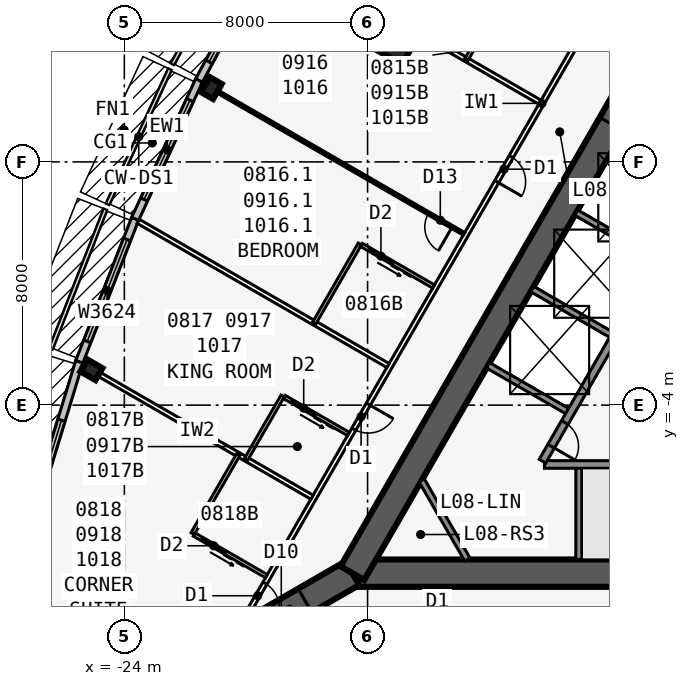
"""IFC4 building model, lengths in metres.
Left out: names, types, materials, properties, quantities, classifications, styles, units other than length and angle.
Written with IfcOpenShell. Run it as: python <this file> out.ifc"""

import sys

from ifc_helpers import new_model, si_unit, direction, frame, frame_2d, origin, origin_2d, place, context, subcontext, project, spatial, rectangle, i_section, extrude, element, fill, save


model = new_model("IFC4")
c1 = context("Model", 3, precision=1e-05, world=origin(), true_north=direction((0.0, 1.0)))
c2 = subcontext(c1, "Body", "Model", "MODEL_VIEW")
j1 = project(units=[si_unit("LENGTHUNIT", "METRE"), si_unit("PLANEANGLEUNIT", "RADIAN")], contexts=[c1])
p1 = place(None, origin())
s1 = spatial("IfcSite", under=j1, at=p1, CompositionType="ELEMENT")
p2 = place(p1, origin())
s2 = spatial("IfcBuilding", under=s1, at=p2, CompositionType="ELEMENT")
p3 = place(p2, frame((0.0, 0.0, 38.7)))
s3 = spatial("IfcBuildingStorey", under=s2, at=p3, CompositionType="ELEMENT", Elevation=38.7)
p4 = place(p3, frame((-16.5, -9.526, 0.0), z_axis=(0.0, 0.0, 1.0), x_axis=(1.0, 0.0, 0.0)))
e1 = element("IfcWall", 1, at=p4, inside=s3, PredefinedType="SHEAR", context=c2, shape_type="SweptSolid", body=[
    extrude(rectangle(XDim=33.0, YDim=0.9, at=frame_2d((16.5, 0.0))), origin(), (0.0, 0.0, 1.0), 3.4),
])
p5 = place(p4, frame((14.05, 0.0, 0.0)))
e2 = element("IfcOpeningElement", 2, at=p5, cuts=e1, PredefinedType="OPENING", context=c2, shape_type="SweptSolid", body=[
    extrude(rectangle(XDim=1.8, YDim=2.13, at=frame_2d((0.9, 1.065))), frame((0.0, 0.46, 0.0), z_axis=(0.0, -1.0, 0.0), x_axis=(1.0, 0.0, 0.0)), (0.0, 0.0, 1.0), 0.92),
])
p6 = place(p3, frame((-10.183, -5.951, 0.0), z_axis=(0.0, 0.0, 1.0), x_axis=(1.0, 0.0, 0.0)))
e3 = element("IfcWall", 3, at=p6, inside=s3, PredefinedType="SOLIDWALL", context=c2, shape_type="SweptSolid", body=[
    extrude(rectangle(XDim=7.633, YDim=0.25, at=frame_2d((3.816, 0.0))), origin(), (0.0, 0.0, 1.0), 3.235),
])
p7 = place(p3, frame((-9.05, -5.951, 0.0), z_axis=(0.0, 0.0, 1.0), x_axis=(0.0, -1.0, 0.0)))
e4 = element("IfcWall", 4, at=p7, inside=s3, PredefinedType="SOLIDWALL", context=c2, shape_type="SweptSolid", body=[
    extrude(rectangle(XDim=3.125, YDim=0.2, at=frame_2d((1.562, 0.0))), origin(), (0.0, 0.0, 1.0), 3.235),
])
p8 = place(p3, frame((0.0, 19.052, 0.0), z_axis=(0.0, 0.0, 1.0), x_axis=(-0.499999749417, -0.866025548458, 0.0)))
e5 = element("IfcWall", 5, at=p8, inside=s3, PredefinedType="SHEAR", context=c2, shape_type="SweptSolid", body=[
    extrude(rectangle(XDim=33.0, YDim=0.9, at=frame_2d((16.5, 0.0))), origin(), (0.0, 0.0, 1.0), 3.4),
])
p9 = place(p8, frame((14.15, 0.0, 0.0)))
e6 = element("IfcOpeningElement", 6, at=p9, cuts=e5, PredefinedType="OPENING", context=c2, shape_type="SweptSolid", body=[
    extrude(rectangle(XDim=1.8, YDim=2.13, at=frame_2d((0.9, 1.065))), frame((0.0, 0.46, 0.0), z_axis=(0.0, -1.0, 0.0), x_axis=(1.0, 0.0, 0.0)), (0.0, 0.0, 1.0), 0.92),
])
p10 = place(p8, frame((12.6, 0.0, 0.0)))
e7 = element("IfcOpeningElement", 7, at=p10, cuts=e5, PredefinedType="OPENING", context=c2, shape_type="SweptSolid", body=[
    extrude(rectangle(XDim=1.0, YDim=2.13, at=frame_2d((0.5, 1.065))), frame((0.0, 0.46, 0.0), z_axis=(0.0, -1.0, 0.0), x_axis=(1.0, 0.0, 0.0)), (0.0, 0.0, 1.0), 0.92),
])
p11 = place(p3, frame((-4.929, 3.365, 0.0), z_axis=(0.0, 0.0, 1.0), x_axis=(-0.499991433582, -0.866030349552, 0.0)))
e8 = element("IfcWall", 8, at=p11, inside=s3, PredefinedType="SOLIDWALL", context=c2, shape_type="SweptSolid", body=[
    extrude(rectangle(XDim=10.633, YDim=0.25, at=frame_2d((5.316, 0.0))), origin(), (0.0, 0.0, 1.0), 3.235),
])
p12 = place(p11, frame((9.164, 0.0, 0.0)))
e9 = element("IfcOpeningElement", 9, at=p12, cuts=e8, PredefinedType="OPENING", context=c2, shape_type="SweptSolid", body=[
    extrude(rectangle(XDim=0.9, YDim=2.13, at=frame_2d((0.45, 1.065))), frame((0.0, 0.135, 0.0), z_axis=(0.0, -1.0, 0.0), x_axis=(1.0, 0.0, 0.0)), (0.0, 0.0, 1.0), 0.27),
])
for number, where, z_axis, x_axis in (
    (10, (-6.429, 0.767, 0.0), (0.0, 0.0, 1.0), (-0.866, 0.5, 0.0)),
    (11, (-7.879, -1.744, 0.0), (0.0, 0.0, 1.0), (-0.866, 0.5, 0.0)),
    (12, (-9.329, -4.256, 0.0), (0.0, 0.0, 1.0), (-0.866, 0.5, 0.0)),
):
    element("IfcWall", number, at=place(p3, frame(where, z_axis=z_axis, x_axis=x_axis)), inside=s3, PredefinedType="SOLIDWALL", context=c2, shape_type="SweptSolid", body=[
        extrude(rectangle(XDim=3.125, YDim=0.2, at=frame_2d((1.562, 0.0))), origin(), (0.0, 0.0, 1.0), 3.235),
    ])
p13 = place(p3, frame((-16.5, -9.526, 0.0), z_axis=(0.0, 0.0, 1.0), x_axis=(-0.866031398331, -0.499989616998, 0.0)))
e13 = element("IfcWall", 13, at=p13, inside=s3, PredefinedType="SHEAR", context=c2, shape_type="SweptSolid", body=[
    extrude(rectangle(XDim=4.746, YDim=0.9, at=frame_2d((2.373, 0.0))), origin(), (0.0, 0.0, 1.0), 3.4),
])
p14 = place(p13, frame((1.8, 0.0, 0.0)))
e14 = element("IfcOpeningElement", 14, at=p14, cuts=e13, PredefinedType="OPENING", context=c2, shape_type="SweptSolid", body=[
    extrude(rectangle(XDim=1.8, YDim=2.13, at=frame_2d((0.9, 1.065))), frame((0.0, 0.46, 0.0), z_axis=(0.0, -1.0, 0.0), x_axis=(1.0, 0.0, 0.0)), (0.0, 0.0, 1.0), 0.92),
])
for number, where, z_axis, x_axis in (
    (15, (-21.137, 6.43, 0.0), (0.0, 0.0, 1.0), (-0.866, 0.5, 0.0)),
    (16, (-25.083, -2.839, 0.0), (0.0, 0.0, 1.0), (-0.5, -0.866, 0.0)),
):
    element("IfcColumn", number, at=place(p3, frame(where, z_axis=z_axis, x_axis=x_axis)), inside=s3, PredefinedType="COLUMN", context=c2, shape_type="SweptSolid", body=[
        extrude(i_section(OverallWidth=0.455, OverallDepth=0.569, WebThickness=0.078, FlangeThickness=0.125, at=origin_2d()), origin(), (0.0, 0.0, 1.0), 3.4),
    ])
p15 = place(p3, frame((-15.312, 8.84, 0.0), z_axis=(0.0, 0.0, 1.0), x_axis=(-0.866025403784, 0.5, 0.0)))
e17 = element("IfcColumn", 17, at=p15, inside=s3, PredefinedType="COLUMN", context=c2, shape_type="SweptSolid", body=[
    extrude(rectangle(XDim=2.4, YDim=2.4, at=origin_2d()), origin(), (0.0, 0.0, 1.0), 3.4),
])
p16 = place(p3, frame((-19.178, 11.077, 0.0), z_axis=(0.0, 0.0, 1.0), x_axis=(-0.473412820489, -0.880840678782, 0.0)))
e18 = element("IfcWall", 18, at=p16, inside=s3, PredefinedType="STANDARD", context=c2, shape_type="SweptSolid", body=[
    extrude(rectangle(XDim=5.002, YDim=0.25, at=frame_2d((2.501, 0.0))), origin(), (0.0, 0.0, 1.0), 3.235),
])
p17 = place(p16, frame((0.701, 0.0, 0.45)))
e19 = element("IfcOpeningElement", 19, at=p17, cuts=e18, PredefinedType="OPENING", context=c2, shape_type="SweptSolid", body=[
    extrude(rectangle(XDim=3.6, YDim=2.4, at=frame_2d((1.8, 1.2))), frame((0.0, 0.135, 0.0), z_axis=(0.0, -1.0, 0.0), x_axis=(1.0, 0.0, 0.0)), (0.0, 0.0, 1.0), 0.27),
])
p18 = place(p3, frame((-21.543, 6.678, 0.0), z_axis=(0.0, 0.0, 1.0), x_axis=(-0.419203100754, -0.907892482796, 0.0)))
e20 = element("IfcWall", 20, at=p18, inside=s3, PredefinedType="STANDARD", context=c2, shape_type="SweptSolid", body=[
    extrude(rectangle(XDim=5.021, YDim=0.25, at=frame_2d((2.51, 0.0))), origin(), (0.0, 0.0, 1.0), 3.235),
])
p19 = place(p18, frame((0.71, 0.0, 0.45)))
e21 = element("IfcOpeningElement", 21, at=p19, cuts=e20, PredefinedType="OPENING", context=c2, shape_type="SweptSolid", body=[
    extrude(rectangle(XDim=3.6, YDim=2.4, at=frame_2d((1.8, 1.2))), frame((0.0, 0.135, 0.0), z_axis=(0.0, -1.0, 0.0), x_axis=(1.0, 0.0, 0.0)), (0.0, 0.0, 1.0), 0.27),
])
p20 = place(p3, frame((-23.645, 2.126, 0.0), z_axis=(0.0, 0.0, 1.0), x_axis=(-0.364013463868, -0.931393685894, 0.0)))
e22 = element("IfcWall", 22, at=p20, inside=s3, PredefinedType="STANDARD", context=c2, shape_type="SweptSolid", body=[
    extrude(rectangle(XDim=5.058, YDim=0.25, at=frame_2d((2.529, 0.0))), origin(), (0.0, 0.0, 1.0), 3.235),
])
p21 = place(p20, frame((0.729, 0.0, 0.45)))
e23 = element("IfcOpeningElement", 23, at=p21, cuts=e22, PredefinedType="OPENING", context=c2, shape_type="SweptSolid", body=[
    extrude(rectangle(XDim=3.6, YDim=2.4, at=frame_2d((1.8, 1.2))), frame((0.0, 0.135, 0.0), z_axis=(0.0, -1.0, 0.0), x_axis=(1.0, 0.0, 0.0)), (0.0, 0.0, 1.0), 0.27),
])
p22 = place(p3, frame((-25.483, -2.575, 0.0), z_axis=(0.0, 0.0, 1.0), x_axis=(-0.2919790669, -0.956424709265, 0.0)))
e24 = element("IfcWall", 24, at=p22, inside=s3, PredefinedType="STANDARD", context=c2, shape_type="SweptSolid", body=[
    extrude(rectangle(XDim=8.211, YDim=0.25, at=frame_2d((4.105, 0.0))), origin(), (0.0, 0.0, 1.0), 3.235),
])
p23 = place(p22, frame((2.006, 0.0, 0.45)))
e25 = element("IfcOpeningElement", 25, at=p23, cuts=e24, PredefinedType="OPENING", context=c2, shape_type="SweptSolid", body=[
    extrude(rectangle(XDim=4.2, YDim=2.4, at=frame_2d((2.1, 1.2))), frame((0.0, 0.135, 0.0), z_axis=(0.0, -1.0, 0.0), x_axis=(1.0, 0.0, 0.0)), (0.0, 0.0, 1.0), 0.27),
])
p24 = place(p3, frame((-0.5, 22.836, 0.0), z_axis=(0.0, 0.0, 1.0), x_axis=(-0.500001677587, -0.866024435227, 0.0)))
e26 = element("IfcWall", 26, at=p24, inside=s3, PredefinedType="PARTITIONING", context=c2, shape_type="SweptSolid", body=[
    extrude(rectangle(XDim=39.054, YDim=0.15, at=frame_2d((19.527, 0.0))), origin(), (0.0, 0.0, 1.0), 3.235),
])
p25 = place(p24, frame((0.352, 0.0, 0.0)))
e27 = element("IfcOpeningElement", 27, at=p25, cuts=e26, PredefinedType="OPENING", context=c2, shape_type="SweptSolid", body=[
    extrude(rectangle(XDim=0.95, YDim=2.13, at=frame_2d((0.475, 1.065))), frame((0.0, 0.085, 0.0), z_axis=(0.0, -1.0, 0.0), x_axis=(1.0, 0.0, 0.0)), (0.0, 0.0, 1.0), 0.17),
])
p26 = place(p24, frame((5.952, 0.0, 0.0)))
e28 = element("IfcOpeningElement", 28, at=p26, cuts=e26, PredefinedType="OPENING", context=c2, shape_type="SweptSolid", body=[
    extrude(rectangle(XDim=0.95, YDim=2.13, at=frame_2d((0.475, 1.065))), frame((0.0, 0.085, 0.0), z_axis=(0.0, -1.0, 0.0), x_axis=(1.0, 0.0, 0.0)), (0.0, 0.0, 1.0), 0.17),
])
p27 = place(p24, frame((11.552, 0.0, 0.0)))
e29 = element("IfcOpeningElement", 29, at=p27, cuts=e26, PredefinedType="OPENING", context=c2, shape_type="SweptSolid", body=[
    extrude(rectangle(XDim=0.95, YDim=2.13, at=frame_2d((0.475, 1.065))), frame((0.0, 0.085, 0.0), z_axis=(0.0, -1.0, 0.0), x_axis=(1.0, 0.0, 0.0)), (0.0, 0.0, 1.0), 0.17),
])
p28 = place(p24, frame((21.552, 0.0, 0.0)))
e30 = element("IfcOpeningElement", 30, at=p28, cuts=e26, PredefinedType="OPENING", context=c2, shape_type="SweptSolid", body=[
    extrude(rectangle(XDim=0.95, YDim=2.13, at=frame_2d((0.475, 1.065))), frame((0.0, 0.085, 0.0), z_axis=(0.0, -1.0, 0.0), x_axis=(1.0, 0.0, 0.0)), (0.0, 0.0, 1.0), 0.17),
])
p29 = place(p24, frame((30.952, 0.0, 0.0)))
e31 = element("IfcOpeningElement", 31, at=p29, cuts=e26, PredefinedType="OPENING", context=c2, shape_type="SweptSolid", body=[
    extrude(rectangle(XDim=0.95, YDim=2.13, at=frame_2d((0.475, 1.065))), frame((0.0, 0.085, 0.0), z_axis=(0.0, -1.0, 0.0), x_axis=(1.0, 0.0, 0.0)), (0.0, 0.0, 1.0), 0.17),
])
p30 = place(p24, frame((37.752, 0.0, 0.0)))
e32 = element("IfcOpeningElement", 32, at=p30, cuts=e26, PredefinedType="OPENING", context=c2, shape_type="SweptSolid", body=[
    extrude(rectangle(XDim=0.95, YDim=2.13, at=frame_2d((0.475, 1.065))), frame((0.0, 0.085, 0.0), z_axis=(0.0, -1.0, 0.0), x_axis=(1.0, 0.0, 0.0)), (0.0, 0.0, 1.0), 0.17),
])
p31 = place(p3, frame((-10.329, 5.963, 0.0), z_axis=(0.0, 0.0, 1.0), x_axis=(-0.866021688545, 0.500006434927, 0.0)))
e33 = element("IfcWall", 33, at=p31, inside=s3, PredefinedType="PARTITIONING", context=c2, shape_type="SweptSolid", body=[
    extrude(rectangle(XDim=10.096, YDim=0.15, at=frame_2d((5.048, 0.0))), origin(), (0.0, 0.0, 1.0), 2.389),
])
p32 = place(p3, frame((-12.829, 1.633, 0.0), z_axis=(0.0, 0.0, 1.0), x_axis=(-0.866026934769, 0.499997348248, 0.0)))
e34 = element("IfcWall", 34, at=p32, inside=s3, PredefinedType="PARTITIONING", context=c2, shape_type="SweptSolid", body=[
    extrude(rectangle(XDim=9.943, YDim=0.1, at=frame_2d((4.971, 0.0))), origin(), (0.0, 0.0, 1.0), 2.389),
])
p33 = place(p32, frame((0.45, 0.0, 0.0)))
e35 = element("IfcOpeningElement", 35, at=p33, cuts=e34, PredefinedType="OPENING", context=c2, shape_type="SweptSolid", body=[
    extrude(rectangle(XDim=0.9, YDim=2.13, at=frame_2d((0.45, 1.065))), frame((0.0, 0.06, 0.0), z_axis=(0.0, -1.0, 0.0), x_axis=(1.0, 0.0, 0.0)), (0.0, 0.0, 1.0), 0.12),
])
p34 = place(p3, frame((-15.329, -2.697, 0.0), z_axis=(0.0, 0.0, 1.0), x_axis=(-0.866018409083, 0.500012114982, 0.0)))
e36 = element("IfcWall", 36, at=p34, inside=s3, PredefinedType="PARTITIONING", context=c2, shape_type="SweptSolid", body=[
    extrude(rectangle(XDim=9.485, YDim=0.15, at=frame_2d((4.742, 0.0))), origin(), (0.0, 0.0, 1.0), 2.389),
])
p35 = place(p3, frame((-17.829, -7.027, 0.0), z_axis=(0.0, 0.0, 1.0), x_axis=(-0.866032659912, 0.499987431809, 0.0)))
e37 = element("IfcWall", 37, at=p35, inside=s3, PredefinedType="PARTITIONING", context=c2, shape_type="SweptSolid", body=[
    extrude(rectangle(XDim=8.72, YDim=0.15, at=frame_2d((4.36, 0.0))), origin(), (0.0, 0.0, 1.0), 2.389),
])
for number, where, z_axis, x_axis in (
    (38, (-11.253, 9.961, 0.0), (0.0, 0.0, 1.0), (-0.5, -0.866, 0.0)),
    (39, (-16.253, 1.301, 0.0), (0.0, 0.0, 1.0), (-0.5, -0.866, 0.0)),
):
    element("IfcWall", number, at=place(p3, frame(where, z_axis=z_axis, x_axis=x_axis)), inside=s3, PredefinedType="PLUMBINGWALL", context=c2, shape_type="SweptSolid", body=[
        extrude(rectangle(XDim=3.0, YDim=0.12, at=frame_2d((1.5, 0.0))), origin(), (0.0, 0.0, 1.0), 3.235),
    ])
p36 = place(p3, frame((-13.829, -0.099, 0.0), z_axis=(0.0, 0.0, 1.0), x_axis=(-0.865997131366, 0.500048966069, 0.0)))
e40 = element("IfcWall", 40, at=p36, inside=s3, PredefinedType="PLUMBINGWALL", context=c2, shape_type="SweptSolid", body=[
    extrude(rectangle(XDim=2.74, YDim=0.12, at=frame_2d((1.37, 0.0))), origin(), (0.0, 0.0, 1.0), 3.235),
])
p37 = place(p36, frame((1.55, 0.0, 0.0)))
e41 = element("IfcOpeningElement", 41, at=p37, cuts=e40, PredefinedType="OPENING", context=c2, shape_type="SweptSolid", body=[
    extrude(rectangle(XDim=0.9, YDim=2.13, at=frame_2d((0.45, 1.065))), frame((0.0, 0.07, 0.0), z_axis=(0.0, -1.0, 0.0), x_axis=(1.0, 0.0, 0.0)), (0.0, 0.0, 1.0), 0.14),
])
p38 = place(p3, frame((-18.793, -3.699, 0.0), z_axis=(0.0, 0.0, 1.0), x_axis=(-0.500001309137, -0.866024647952, 0.0)))
e42 = element("IfcWall", 42, at=p38, inside=s3, PredefinedType="PLUMBINGWALL", context=c2, shape_type="SweptSolid", body=[
    extrude(rectangle(XDim=2.4, YDim=0.12, at=frame_2d((1.2, 0.0))), origin(), (0.0, 0.0, 1.0), 3.235),
])
p39 = place(p3, frame((-16.628, -4.949, 0.0), z_axis=(0.0, 0.0, 1.0), x_axis=(-0.866048967903, 0.499959183527, 0.0)))
e43 = element("IfcWall", 43, at=p39, inside=s3, PredefinedType="PLUMBINGWALL", context=c2, shape_type="SweptSolid", body=[
    extrude(rectangle(XDim=2.44, YDim=0.12, at=frame_2d((1.22, 0.0))), origin(), (0.0, 0.0, 1.0), 3.235),
])
p40 = place(p39, frame((1.25, 0.0, 0.0)))
e44 = element("IfcOpeningElement", 44, at=p40, cuts=e43, PredefinedType="OPENING", context=c2, shape_type="SweptSolid", body=[
    extrude(rectangle(XDim=0.9, YDim=2.13, at=frame_2d((0.45, 1.065))), frame((0.0, 0.07, 0.0), z_axis=(0.0, -1.0, 0.0), x_axis=(1.0, 0.0, 0.0)), (0.0, 0.0, 1.0), 0.14),
])
p41 = place(p3, frame((-20.253, -5.627, 0.0), z_axis=(0.0, 0.0, 1.0), x_axis=(-0.499990139034, -0.866031096941, 0.0)))
e45 = element("IfcWall", 45, at=p41, inside=s3, PredefinedType="PLUMBINGWALL", context=c2, shape_type="SweptSolid", body=[
    extrude(rectangle(XDim=3.0, YDim=0.12, at=frame_2d((1.5, 0.0))), origin(), (0.0, 0.0, 1.0), 3.235),
])
p42 = place(p3, frame((-19.329, -9.625, 0.0), z_axis=(0.0, 0.0, 1.0), x_axis=(-0.866035715982, 0.499982138324, 0.0)))
e46 = element("IfcWall", 46, at=p42, inside=s3, PredefinedType="PLUMBINGWALL", context=c2, shape_type="SweptSolid", body=[
    extrude(rectangle(XDim=2.74, YDim=0.12, at=frame_2d((1.37, 0.0))), origin(), (0.0, 0.0, 1.0), 3.235),
])
p43 = place(p42, frame((1.55, 0.0, 0.0)))
e47 = element("IfcOpeningElement", 47, at=p43, cuts=e46, PredefinedType="OPENING", context=c2, shape_type="SweptSolid", body=[
    extrude(rectangle(XDim=0.9, YDim=2.13, at=frame_2d((0.45, 1.065))), frame((0.0, 0.07, 0.0), z_axis=(0.0, -1.0, 0.0), x_axis=(1.0, 0.0, 0.0)), (0.0, 0.0, 1.0), 0.14),
])
p44 = place(p3, frame((-12.719, -9.076, 0.0), z_axis=(0.0, 0.0, 1.0), x_axis=(-0.499952404951, 0.866052881055, 0.0)))
e48 = element("IfcWall", 48, at=p44, inside=s3, PredefinedType="SOLIDWALL", context=c2, shape_type="SweptSolid", body=[
    extrude(rectangle(XDim=3.002, YDim=0.2, at=frame_2d((1.501, 0.0))), origin(), (0.0, 0.0, 1.0), 3.235),
])
p45 = place(p17, origin())
e49 = element("IfcWindow", 49, at=p45, inside=s3, PartitioningType="SINGLE_PANEL", PredefinedType="WINDOW", context=c2, shape_type="SweptSolid", body=[
    extrude(rectangle(XDim=3.6, YDim=2.4, at=frame_2d((1.8, 1.2))), frame((0.0, 0.03, 0.0), z_axis=(0.0, -1.0, 0.0), x_axis=(1.0, 0.0, 0.0)), (0.0, 0.0, 1.0), 0.06),
])
fill(e19, e49)
p46 = place(p19, origin())
e50 = element("IfcWindow", 50, at=p46, inside=s3, PartitioningType="SINGLE_PANEL", PredefinedType="WINDOW", context=c2, shape_type="SweptSolid", body=[
    extrude(rectangle(XDim=3.6, YDim=2.4, at=frame_2d((1.8, 1.2))), frame((0.0, 0.03, 0.0), z_axis=(0.0, -1.0, 0.0), x_axis=(1.0, 0.0, 0.0)), (0.0, 0.0, 1.0), 0.06),
])
fill(e21, e50)
p47 = place(p21, origin())
e51 = element("IfcWindow", 51, at=p47, inside=s3, PartitioningType="SINGLE_PANEL", PredefinedType="WINDOW", context=c2, shape_type="SweptSolid", body=[
    extrude(rectangle(XDim=3.6, YDim=2.4, at=frame_2d((1.8, 1.2))), frame((0.0, 0.03, 0.0), z_axis=(0.0, -1.0, 0.0), x_axis=(1.0, 0.0, 0.0)), (0.0, 0.0, 1.0), 0.06),
])
fill(e23, e51)
p48 = place(p23, origin())
e52 = element("IfcWindow", 52, at=p48, inside=s3, PartitioningType="SINGLE_PANEL", PredefinedType="WINDOW", context=c2, shape_type="SweptSolid", body=[
    extrude(rectangle(XDim=4.2, YDim=2.4, at=frame_2d((2.1, 1.2))), frame((0.0, 0.03, 0.0), z_axis=(0.0, -1.0, 0.0), x_axis=(1.0, 0.0, 0.0)), (0.0, 0.0, 1.0), 0.06),
])
fill(e25, e52)
p49 = place(p33, origin())
e53 = element("IfcDoor", 53, at=p49, inside=s3, OperationType="SINGLE_SWING_LEFT", PredefinedType="DOOR", context=c2, shape_type="SweptSolid", body=[
    extrude(rectangle(XDim=0.9, YDim=2.13, at=frame_2d((0.45, 1.065))), frame((0.0, 0.025, 0.0), z_axis=(0.0, -1.0, 0.0), x_axis=(1.0, 0.0, 0.0)), (0.0, 0.0, 1.0), 0.05),
])
fill(e35, e53)
p50 = place(p28, origin())
e54 = element("IfcDoor", 54, at=p50, inside=s3, OperationType="SINGLE_SWING_RIGHT", PredefinedType="DOOR", context=c2, shape_type="SweptSolid", body=[
    extrude(rectangle(XDim=0.95, YDim=2.13, at=frame_2d((0.475, 1.065))), frame((0.0, 0.025, 0.0), z_axis=(0.0, -1.0, 0.0), x_axis=(1.0, 0.0, 0.0)), (0.0, 0.0, 1.0), 0.05),
])
fill(e30, e54)
p51 = place(p37, origin())
e55 = element("IfcDoor", 55, at=p51, inside=s3, OperationType="SLIDING_TO_LEFT", PredefinedType="DOOR", context=c2, shape_type="SweptSolid", body=[
    extrude(rectangle(XDim=0.9, YDim=2.13, at=frame_2d((0.45, 1.065))), frame((0.0, 0.025, 0.0), z_axis=(0.0, -1.0, 0.0), x_axis=(1.0, 0.0, 0.0)), (0.0, 0.0, 1.0), 0.05),
])
fill(e41, e55)
p52 = place(p40, origin())
e56 = element("IfcDoor", 56, at=p52, inside=s3, OperationType="SLIDING_TO_LEFT", PredefinedType="DOOR", context=c2, shape_type="SweptSolid", body=[
    extrude(rectangle(XDim=0.9, YDim=2.13, at=frame_2d((0.45, 1.065))), frame((0.0, 0.025, 0.0), z_axis=(0.0, -1.0, 0.0), x_axis=(1.0, 0.0, 0.0)), (0.0, 0.0, 1.0), 0.05),
])
fill(e44, e56)
p53 = place(p29, origin())
e57 = element("IfcDoor", 57, at=p53, inside=s3, OperationType="SINGLE_SWING_LEFT", PredefinedType="DOOR", context=c2, shape_type="SweptSolid", body=[
    extrude(rectangle(XDim=0.95, YDim=2.13, at=frame_2d((0.475, 1.065))), frame((0.0, 0.025, 0.0), z_axis=(0.0, -1.0, 0.0), x_axis=(1.0, 0.0, 0.0)), (0.0, 0.0, 1.0), 0.05),
])
fill(e31, e57)
p54 = place(p43, origin())
e58 = element("IfcDoor", 58, at=p54, inside=s3, OperationType="SLIDING_TO_LEFT", PredefinedType="DOOR", context=c2, shape_type="SweptSolid", body=[
    extrude(rectangle(XDim=0.9, YDim=2.13, at=frame_2d((0.45, 1.065))), frame((0.0, 0.025, 0.0), z_axis=(0.0, -1.0, 0.0), x_axis=(1.0, 0.0, 0.0)), (0.0, 0.0, 1.0), 0.05),
])
fill(e47, e58)
p55 = place(p30, origin())
e59 = element("IfcDoor", 59, at=p55, inside=s3, OperationType="SINGLE_SWING_RIGHT", PredefinedType="DOOR", context=c2, shape_type="SweptSolid", body=[
    extrude(rectangle(XDim=0.95, YDim=2.13, at=frame_2d((0.475, 1.065))), frame((0.0, 0.025, 0.0), z_axis=(0.0, -1.0, 0.0), x_axis=(1.0, 0.0, 0.0)), (0.0, 0.0, 1.0), 0.05),
])
fill(e32, e59)
p56 = place(p14, origin())
e60 = element("IfcDoor", 60, at=p56, inside=s3, OperationType="DOUBLE_DOOR_DOUBLE_SWING", PredefinedType="DOOR", context=c2, shape_type="SweptSolid", body=[
    extrude(rectangle(XDim=1.8, YDim=2.13, at=frame_2d((0.9, 1.065))), frame((0.0, 0.025, 0.0), z_axis=(0.0, -1.0, 0.0), x_axis=(1.0, 0.0, 0.0)), (0.0, 0.0, 1.0), 0.05),
])
fill(e14, e60)
p57 = place(p12, origin())
e61 = element("IfcDoor", 61, at=p57, inside=s3, OperationType="SINGLE_SWING_RIGHT", PredefinedType="DOOR", context=c2, shape_type="SweptSolid", body=[
    extrude(rectangle(XDim=0.9, YDim=2.13, at=frame_2d((0.45, 1.065))), frame((0.0, 0.025, 0.0), z_axis=(0.0, -1.0, 0.0), x_axis=(1.0, 0.0, 0.0)), (0.0, 0.0, 1.0), 0.05),
])
fill(e9, e61)
save(model, sys.argv[1])
